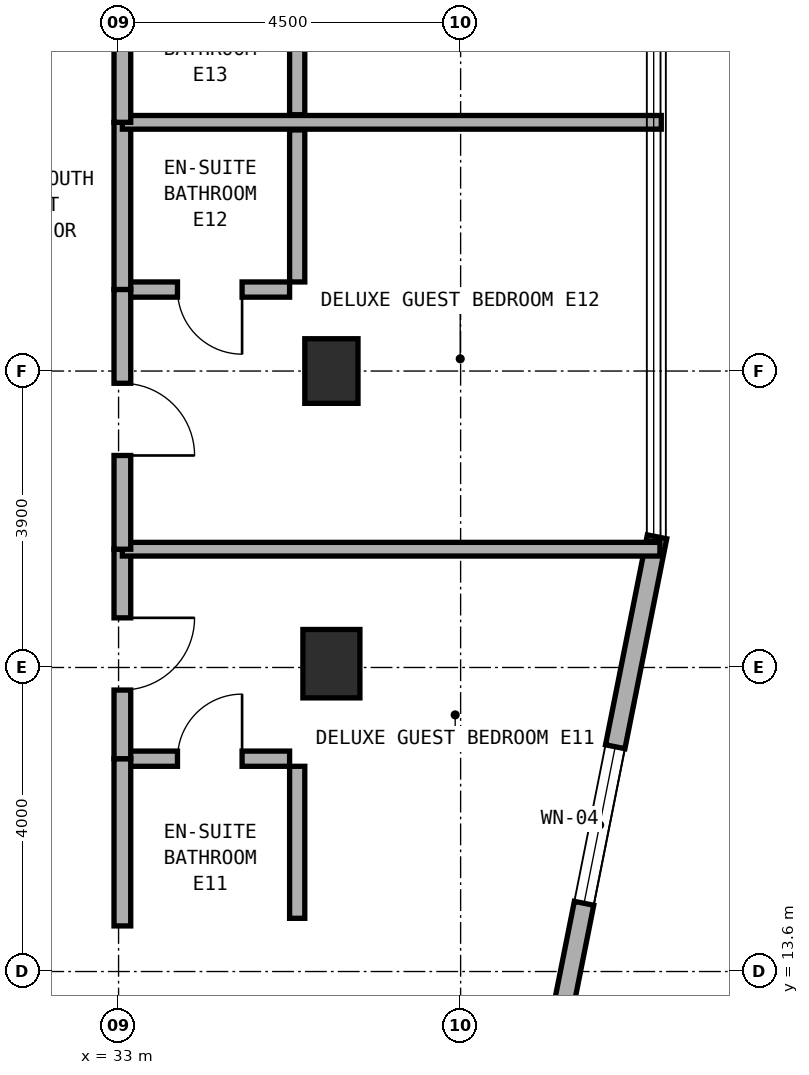
"""IFC4 building model, lengths in metres.
Left out: names, types, materials, properties, quantities, classifications, styles, units other than length and angle.
Written with IfcOpenShell. Run it as: python <this file> out.ifc"""

import sys

from ifc_helpers import new_model, si_unit, direction, frame, frame_2d, origin, origin_2d, place, context, subcontext, project, spatial, rectangle, extrude, element, fill, save


model = new_model("IFC4")
c1 = context("Model", 3, precision=1e-05, world=origin(), true_north=direction((0.0, 1.0)))
c2 = subcontext(c1, "Body", "Model", "MODEL_VIEW")
j1 = project(units=[si_unit("LENGTHUNIT", "METRE"), si_unit("PLANEANGLEUNIT", "RADIAN")], contexts=[c1])
p1 = place(None, origin())
s1 = spatial("IfcSite", under=j1, at=p1, CompositionType="ELEMENT")
p2 = place(p1, origin())
s2 = spatial("IfcBuilding", under=s1, at=p2, CompositionType="ELEMENT")
p3 = place(p2, frame((0.0, 0.0, 224.3)))
s3 = spatial("IfcBuildingStorey", under=s2, at=p3, CompositionType="ELEMENT", Elevation=224.3)
p4 = place(p3, frame((35.8, 21.5, 0.0), z_axis=(0.0, 0.0, 1.0), x_axis=(1.0, 0.0, 0.0)))
e1 = element("IfcColumn", 1, at=p4, inside=s3, PredefinedType="COLUMN", context=c2, shape_type="SweptSolid", body=[
    extrude(rectangle(XDim=0.7, YDim=0.85, at=origin_2d()), origin(), (0.0, 0.0, 1.0), 3.6),
])
p5 = place(p3, frame((35.8, 17.65, 0.0), z_axis=(0.0, 0.0, 1.0), x_axis=(1.0, 0.0, 0.0)))
e2 = element("IfcColumn", 2, at=p5, inside=s3, PredefinedType="COLUMN", context=c2, shape_type="SweptSolid", body=[
    extrude(rectangle(XDim=0.75, YDim=0.9, at=origin_2d()), origin(), (0.0, 0.0, 1.0), 3.6),
])
p6 = place(p3, frame((38.371, 10.717, 0.0), z_axis=(0.0, 0.0, 1.0), x_axis=(0.195291715883, 0.980745199176, 0.0)))
e3 = element("IfcWall", 3, at=p6, inside=s3, PredefinedType="STANDARD", context=c2, shape_type="SweptSolid", body=[
    extrude(rectangle(XDim=8.771, YDim=0.26, at=frame_2d((4.385, 0.0))), origin(), (0.0, 0.0, 1.0), 3.32),
])
p7 = place(p6, frame((3.855, 0.0, 0.85)))
e4 = element("IfcOpeningElement", 4, at=p7, cuts=e3, PredefinedType="OPENING", context=c2, shape_type="SweptSolid", body=[
    extrude(rectangle(XDim=2.1, YDim=1.5, at=frame_2d((1.05, 0.75))), frame((0.0, 0.14, 0.0), z_axis=(0.0, -1.0, 0.0), x_axis=(1.0, 0.0, 0.0)), (0.0, 0.0, 1.0), 0.28),
])
p8 = place(p3, frame((33.15, 16.4, 0.0), z_axis=(0.0, 0.0, 1.0), x_axis=(1.0, 0.0, 0.0)))
e5 = element("IfcWall", 5, at=p8, inside=s3, PredefinedType="PLUMBINGWALL", context=c2, shape_type="SweptSolid", body=[
    extrude(rectangle(XDim=2.1, YDim=0.2, at=frame_2d((1.05, 0.0))), origin(), (0.0, 0.0, 1.0), 3.32),
])
p9 = place(p8, frame((0.625, 0.0, 0.0)))
e6 = element("IfcOpeningElement", 6, at=p9, cuts=e5, PredefinedType="OPENING", context=c2, shape_type="SweptSolid", body=[
    extrude(rectangle(XDim=0.85, YDim=2.1, at=frame_2d((0.425, 1.05))), frame((0.0, 0.11, 0.0), z_axis=(0.0, -1.0, 0.0), x_axis=(1.0, 0.0, 0.0)), (0.0, 0.0, 1.0), 0.22),
])
p10 = place(p3, frame((35.35, 14.3, 0.0), z_axis=(0.0, 0.0, 1.0), x_axis=(0.0, 1.0, 0.0)))
e7 = element("IfcWall", 7, at=p10, inside=s3, PredefinedType="PLUMBINGWALL", context=c2, shape_type="SweptSolid", body=[
    extrude(rectangle(XDim=2.0, YDim=0.2, at=frame_2d((1.0, 0.0))), origin(), (0.0, 0.0, 1.0), 3.015),
])
p11 = place(p3, frame((33.05, 14.2, 0.0), z_axis=(0.0, 0.0, 1.0), x_axis=(0.0, 1.0, 0.0)))
e8 = element("IfcWall", 8, at=p11, inside=s3, PredefinedType="SOLIDWALL", context=c2, shape_type="SweptSolid", body=[
    extrude(rectangle(XDim=2.2, YDim=0.22, at=frame_2d((1.1, 0.0))), origin(), (0.0, 0.0, 1.0), 3.32),
])
p12 = place(p3, frame((33.05, 16.4, 0.0), z_axis=(0.0, 0.0, 1.0), x_axis=(0.0, 1.0, 0.0)))
e9 = element("IfcWall", 9, at=p12, inside=s3, PredefinedType="SOLIDWALL", context=c2, shape_type="SweptSolid", body=[
    extrude(rectangle(XDim=2.756, YDim=0.22, at=frame_2d((1.378, 0.0))), origin(), (0.0, 0.0, 1.0), 2.695),
])
p13 = place(p12, frame((0.903, 0.0, 0.0)))
e10 = element("IfcOpeningElement", 10, at=p13, cuts=e9, PredefinedType="OPENING", context=c2, shape_type="SweptSolid", body=[
    extrude(rectangle(XDim=0.95, YDim=2.1, at=frame_2d((0.475, 1.05))), frame((0.0, 0.12, 0.0), z_axis=(0.0, -1.0, 0.0), x_axis=(1.0, 0.0, 0.0)), (0.0, 0.0, 1.0), 0.24),
])
p14 = place(p3, frame((33.05, 19.156, 0.0), z_axis=(0.0, 0.0, 1.0), x_axis=(1.0, 0.0, 0.0)))
e11 = element("IfcWall", 11, at=p14, inside=s3, PredefinedType="SOLIDWALL", context=c2, shape_type="SweptSolid", body=[
    extrude(rectangle(XDim=7.072, YDim=0.18, at=frame_2d((3.536, 0.0))), origin(), (0.0, 0.0, 1.0), 3.015),
])
p15 = place(p3, frame((33.15, 22.572, 0.0), z_axis=(0.0, 0.0, 1.0), x_axis=(1.0, 0.0, 0.0)))
e12 = element("IfcWall", 12, at=p15, inside=s3, PredefinedType="PLUMBINGWALL", context=c2, shape_type="SweptSolid", body=[
    extrude(rectangle(XDim=2.1, YDim=0.2, at=frame_2d((1.05, 0.0))), origin(), (0.0, 0.0, 1.0), 3.32),
])
p16 = place(p15, frame((0.625, 0.0, 0.0)))
e13 = element("IfcOpeningElement", 13, at=p16, cuts=e12, PredefinedType="OPENING", context=c2, shape_type="SweptSolid", body=[
    extrude(rectangle(XDim=0.85, YDim=2.1, at=frame_2d((0.425, 1.05))), frame((0.0, 0.11, 0.0), z_axis=(0.0, -1.0, 0.0), x_axis=(1.0, 0.0, 0.0)), (0.0, 0.0, 1.0), 0.22),
])
p17 = place(p3, frame((35.35, 22.672, 0.0), z_axis=(0.0, 0.0, 1.0), x_axis=(0.0, 1.0, 0.0)))
e14 = element("IfcWall", 14, at=p17, inside=s3, PredefinedType="PLUMBINGWALL", context=c2, shape_type="SweptSolid", body=[
    extrude(rectangle(XDim=2.0, YDim=0.2, at=frame_2d((1.0, 0.0))), origin(), (0.0, 0.0, 1.0), 3.32),
])
p18 = place(p3, frame((33.05, 22.572, 0.0), z_axis=(0.0, 0.0, 1.0), x_axis=(0.0, 1.0, 0.0)))
e15 = element("IfcWall", 15, at=p18, inside=s3, PredefinedType="SOLIDWALL", context=c2, shape_type="SweptSolid", body=[
    extrude(rectangle(XDim=2.2, YDim=0.22, at=frame_2d((1.1, 0.0))), origin(), (0.0, 0.0, 1.0), 3.32),
])
p19 = place(p3, frame((33.05, 19.156, 0.0), z_axis=(0.0, 0.0, 1.0), x_axis=(0.0, 1.0, 0.0)))
e16 = element("IfcWall", 16, at=p19, inside=s3, PredefinedType="SOLIDWALL", context=c2, shape_type="SweptSolid", body=[
    extrude(rectangle(XDim=3.416, YDim=0.22, at=frame_2d((1.708, 0.0))), origin(), (0.0, 0.0, 1.0), 2.695),
])
p20 = place(p19, frame((1.233, 0.0, 0.0)))
e17 = element("IfcOpeningElement", 17, at=p20, cuts=e16, PredefinedType="OPENING", context=c2, shape_type="SweptSolid", body=[
    extrude(rectangle(XDim=0.95, YDim=2.1, at=frame_2d((0.475, 1.05))), frame((0.0, 0.12, 0.0), z_axis=(0.0, -1.0, 0.0), x_axis=(1.0, 0.0, 0.0)), (0.0, 0.0, 1.0), 0.24),
])
p21 = place(p3, frame((33.05, 24.772, 0.0), z_axis=(0.0, 0.0, 1.0), x_axis=(1.0, 0.0, 0.0)))
e18 = element("IfcWall", 18, at=p21, inside=s3, PredefinedType="SOLIDWALL", context=c2, shape_type="SweptSolid", body=[
    extrude(rectangle(XDim=7.09, YDim=0.18, at=frame_2d((3.545, 0.0))), origin(), (0.0, 0.0, 1.0), 3.015),
])
p22 = place(p3, frame((35.35, 24.872, 0.0), z_axis=(0.0, 0.0, 1.0), x_axis=(0.0, 1.0, 0.0)))
e19 = element("IfcWall", 19, at=p22, inside=s3, PredefinedType="PLUMBINGWALL", context=c2, shape_type="SweptSolid", body=[
    extrude(rectangle(XDim=2.0, YDim=0.2, at=frame_2d((1.0, 0.0))), origin(), (0.0, 0.0, 1.0), 3.32),
])
p23 = place(p3, frame((33.05, 24.772, 0.0), z_axis=(0.0, 0.0, 1.0), x_axis=(0.0, 1.0, 0.0)))
e20 = element("IfcWall", 20, at=p23, inside=s3, PredefinedType="SOLIDWALL", context=c2, shape_type="SweptSolid", body=[
    extrude(rectangle(XDim=2.2, YDim=0.22, at=frame_2d((1.1, 0.0))), origin(), (0.0, 0.0, 1.0), 3.32),
])
p24 = place(p7, origin())
e21 = element("IfcWindow", 21, at=p24, inside=s3, PartitioningType="SINGLE_PANEL", PredefinedType="WINDOW", context=c2, shape_type="SweptSolid", body=[
    extrude(rectangle(XDim=2.1, YDim=1.5, at=frame_2d((1.05, 0.75))), frame((0.0, 0.03, 0.0), z_axis=(0.0, -1.0, 0.0), x_axis=(1.0, 0.0, 0.0)), (0.0, 0.0, 1.0), 0.06),
])
fill(e4, e21)
p25 = place(p9, origin())
e22 = element("IfcDoor", 22, at=p25, inside=s3, OperationType="SINGLE_SWING_RIGHT", PredefinedType="DOOR", context=c2, shape_type="SweptSolid", body=[
    extrude(rectangle(XDim=0.85, YDim=2.1, at=frame_2d((0.425, 1.05))), frame((0.0, 0.025, 0.0), z_axis=(0.0, -1.0, 0.0), x_axis=(1.0, 0.0, 0.0)), (0.0, 0.0, 1.0), 0.05),
])
fill(e6, e22)
p26 = place(p13, frame((0.95, 0.0, 0.0), z_axis=(0.0, 0.0, 1.0), x_axis=(-1.0, 0.0, 0.0)))
e23 = element("IfcDoor", 23, at=p26, inside=s3, OperationType="SINGLE_SWING_LEFT", PredefinedType="DOOR", context=c2, shape_type="SweptSolid", body=[
    extrude(rectangle(XDim=0.95, YDim=2.1, at=frame_2d((0.475, 1.05))), frame((0.0, 0.025, 0.0), z_axis=(0.0, -1.0, 0.0), x_axis=(1.0, 0.0, 0.0)), (0.0, 0.0, 1.0), 0.05),
])
fill(e10, e23)
p27 = place(p16, frame((0.85, 0.0, 0.0), z_axis=(0.0, 0.0, 1.0), x_axis=(-1.0, 0.0, 0.0)))
e24 = element("IfcDoor", 24, at=p27, inside=s3, OperationType="SINGLE_SWING_LEFT", PredefinedType="DOOR", context=c2, shape_type="SweptSolid", body=[
    extrude(rectangle(XDim=0.85, YDim=2.1, at=frame_2d((0.425, 1.05))), frame((0.0, 0.025, 0.0), z_axis=(0.0, -1.0, 0.0), x_axis=(1.0, 0.0, 0.0)), (0.0, 0.0, 1.0), 0.05),
])
fill(e13, e24)
p28 = place(p20, frame((0.95, 0.0, 0.0), z_axis=(0.0, 0.0, 1.0), x_axis=(-1.0, 0.0, 0.0)))
e25 = element("IfcDoor", 25, at=p28, inside=s3, OperationType="SINGLE_SWING_RIGHT", PredefinedType="DOOR", context=c2, shape_type="SweptSolid", body=[
    extrude(rectangle(XDim=0.95, YDim=2.1, at=frame_2d((0.475, 1.05))), frame((0.0, 0.025, 0.0), z_axis=(0.0, -1.0, 0.0), x_axis=(1.0, 0.0, 0.0)), (0.0, 0.0, 1.0), 0.05),
])
fill(e17, e25)
save(model, sys.argv[1])
